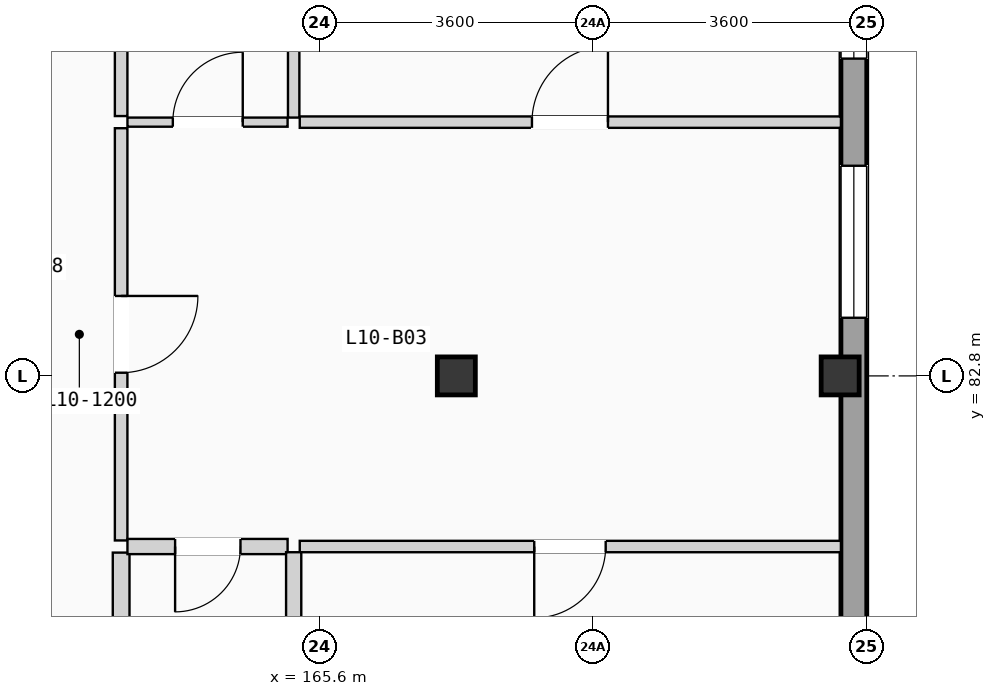
"""IFC4 building model, lengths in metres.
Left out: names, types, materials, properties, quantities, classifications, styles, units other than length and angle.
Written with IfcOpenShell. Run it as: python <this file> out.ifc"""

import sys

from ifc_helpers import new_model, si_unit, direction, frame, frame_2d, origin, origin_2d, place, context, subcontext, project, spatial, rectangle, extrude, element, fill, save


model = new_model("IFC4")
c1 = context("Model", 3, precision=1e-05, world=origin(), true_north=direction((0.0, 1.0)))
c2 = subcontext(c1, "Body", "Model", "MODEL_VIEW")
j1 = project(units=[si_unit("LENGTHUNIT", "METRE"), si_unit("PLANEANGLEUNIT", "RADIAN")], contexts=[c1])
p1 = place(None, origin())
s1 = spatial("IfcSite", under=j1, at=p1, CompositionType="ELEMENT")
p2 = place(p1, origin())
s2 = spatial("IfcBuilding", under=s1, at=p2, CompositionType="ELEMENT")
p3 = place(p2, frame((0.0, 0.0, 34.125)))
s3 = spatial("IfcBuildingStorey", under=s2, at=p3, CompositionType="ELEMENT", Elevation=34.125)
for number, where, z_axis, x_axis in (
    (1, (167.4, 82.8, 0.0), (0.0, 0.0, 1.0), (1.0, 0.0, 0.0)),
    (2, (172.45, 82.8, 0.0), (0.0, 0.0, 1.0), (1.0, 0.0, 0.0)),
):
    element("IfcColumn", number, at=place(p3, frame(where, z_axis=z_axis, x_axis=x_axis)), inside=s3, PredefinedType="COLUMN", context=c2, shape_type="SweptSolid", body=[
        extrude(rectangle(XDim=0.5, YDim=0.5, at=origin_2d()), origin(), (0.0, 0.0, 1.0), 3.15),
    ])
p4 = place(p3, frame((172.63, 68.74, 0.0), z_axis=(0.0, 0.0, 1.0), x_axis=(0.0, 1.0, 0.0)))
e3 = element("IfcWall", 3, at=p4, inside=s3, PredefinedType="SOLIDWALL", context=c2, shape_type="SweptSolid", body=[
    extrude(rectangle(XDim=49.72, YDim=0.34, at=frame_2d((24.86, 0.0))), origin(), (0.0, 0.0, 1.0), 2.89),
])
p5 = place(p4, frame((14.825, 0.0, 0.855)))
e4 = element("IfcOpeningElement", 4, at=p5, cuts=e3, PredefinedType="OPENING", context=c2, shape_type="SweptSolid", body=[
    extrude(rectangle(XDim=2.0, YDim=1.35, at=frame_2d((1.0, 0.675))), frame((0.0, 0.18, 0.0), z_axis=(0.0, -1.0, 0.0), x_axis=(1.0, 0.0, 0.0)), (0.0, 0.0, 1.0), 0.36),
])
p6 = place(p4, frame((8.498, 0.0, 0.705)))
e5 = element("IfcOpeningElement", 5, at=p6, cuts=e3, PredefinedType="OPENING", context=c2, shape_type="SweptSolid", body=[
    extrude(rectangle(XDim=2.0, YDim=1.5, at=frame_2d((1.0, 0.75))), frame((0.0, 0.18, 0.0), z_axis=(0.0, -1.0, 0.0), x_axis=(1.0, 0.0, 0.0)), (0.0, 0.0, 1.0), 0.36),
])
p7 = place(p4, frame((18.235, 0.0, 0.555)))
e6 = element("IfcOpeningElement", 6, at=p7, cuts=e3, PredefinedType="OPENING", context=c2, shape_type="SweptSolid", body=[
    extrude(rectangle(XDim=2.0, YDim=1.65, at=frame_2d((1.0, 0.825))), frame((0.0, 0.18, 0.0), z_axis=(0.0, -1.0, 0.0), x_axis=(1.0, 0.0, 0.0)), (0.0, 0.0, 1.0), 0.36),
])
p8 = place(p4, frame((31.585, 0.0, 0.85)))
e7 = element("IfcOpeningElement", 7, at=p8, cuts=e3, PredefinedType="OPENING", context=c2, shape_type="SweptSolid", body=[
    extrude(rectangle(XDim=0.95, YDim=1.2, at=frame_2d((0.475, 0.6))), frame((0.0, 0.18, 0.0), z_axis=(0.0, -1.0, 0.0), x_axis=(1.0, 0.0, 0.0)), (0.0, 0.0, 1.0), 0.36),
])
p9 = place(p4, frame((24.087, 0.0, 0.9)))
e8 = element("IfcOpeningElement", 8, at=p9, cuts=e3, PredefinedType="OPENING", context=c2, shape_type="SweptSolid", body=[
    extrude(rectangle(XDim=2.15, YDim=1.2, at=frame_2d((1.075, 0.6))), frame((0.0, 0.18, 0.0), z_axis=(0.0, -1.0, 0.0), x_axis=(1.0, 0.0, 0.0)), (0.0, 0.0, 1.0), 0.36),
])
p10 = place(p4, frame((38.12, 0.0, 0.855)))
e9 = element("IfcOpeningElement", 9, at=p10, cuts=e3, PredefinedType="OPENING", context=c2, shape_type="SweptSolid", body=[
    extrude(rectangle(XDim=2.15, YDim=1.35, at=frame_2d((1.075, 0.675))), frame((0.0, 0.18, 0.0), z_axis=(0.0, -1.0, 0.0), x_axis=(1.0, 0.0, 0.0)), (0.0, 0.0, 1.0), 0.36),
])
p11 = place(p3, frame((162.99, 80.635, 0.0), z_axis=(0.0, 0.0, 1.0), x_axis=(0.0, 1.0, 0.0)))
e10 = element("IfcWall", 10, at=p11, inside=s3, PredefinedType="PARTITIONING", context=c2, shape_type="SweptSolid", body=[
    extrude(rectangle(XDim=5.424, YDim=0.165, at=frame_2d((2.712, 0.0))), origin(), (0.0, 0.0, 1.0), 2.87),
])
p12 = place(p11, frame((2.207, 0.0, 0.0)))
e11 = element("IfcOpeningElement", 11, at=p12, cuts=e10, PredefinedType="OPENING", context=c2, shape_type="SweptSolid", body=[
    extrude(rectangle(XDim=1.01, YDim=2.11, at=frame_2d((0.505, 1.055))), frame((0.0, 0.093, 0.0), z_axis=(0.0, -1.0, 0.0), x_axis=(1.0, 0.0, 0.0)), (0.0, 0.0, 1.0), 0.185),
])
p13 = place(p3, frame((162.99, 75.975, 0.0), z_axis=(0.0, 0.0, 1.0), x_axis=(0.0, 1.0, 0.0)))
e12 = element("IfcWall", 12, at=p13, inside=s3, PredefinedType="PLUMBINGWALL", context=c2, shape_type="SweptSolid", body=[
    extrude(rectangle(XDim=4.5, YDim=0.22, at=frame_2d((2.25, 0.0))), origin(), (0.0, 0.0, 1.0), 2.87),
])
p14 = place(p3, frame((162.99, 86.219, 0.0), z_axis=(0.0, 0.0, 1.0), x_axis=(0.0, 1.0, 0.0)))
e13 = element("IfcWall", 13, at=p14, inside=s3, PredefinedType="PARTITIONING", context=c2, shape_type="SweptSolid", body=[
    extrude(rectangle(XDim=4.475, YDim=0.165, at=frame_2d((2.238, 0.0))), origin(), (0.0, 0.0, 1.0), 2.87),
])
p15 = place(p3, frame((163.073, 80.555, 0.0), z_axis=(0.0, 0.0, 1.0), x_axis=(1.0, 0.0, 0.0)))
e14 = element("IfcWall", 14, at=p15, inside=s3, PredefinedType="PLUMBINGWALL", context=c2, shape_type="SweptSolid", body=[
    extrude(rectangle(XDim=2.107, YDim=0.2, at=frame_2d((1.053, 0.0))), origin(), (0.0, 0.0, 1.0), 2.87),
])
p16 = place(p15, frame((0.627, 0.0, 0.0)))
e15 = element("IfcOpeningElement", 15, at=p16, cuts=e14, PredefinedType="OPENING", context=c2, shape_type="SweptSolid", body=[
    extrude(rectangle(XDim=0.86, YDim=2.0, at=frame_2d((0.43, 1.0))), frame((0.0, 0.11, 0.0), z_axis=(0.0, -1.0, 0.0), x_axis=(1.0, 0.0, 0.0)), (0.0, 0.0, 1.0), 0.22),
])
p17 = place(p3, frame((163.073, 86.139, 0.0), z_axis=(0.0, 0.0, 1.0), x_axis=(1.0, 0.0, 0.0)))
e16 = element("IfcWall", 16, at=p17, inside=s3, PredefinedType="PARTITIONING", context=c2, shape_type="SweptSolid", body=[
    extrude(rectangle(XDim=2.107, YDim=0.12, at=frame_2d((1.053, 0.0))), origin(), (0.0, 0.0, 1.0), 2.87),
])
p18 = place(p17, frame((0.597, 0.0, 0.0)))
e17 = element("IfcOpeningElement", 17, at=p18, cuts=e16, PredefinedType="OPENING", context=c2, shape_type="SweptSolid", body=[
    extrude(rectangle(XDim=0.92, YDim=2.02, at=frame_2d((0.46, 1.01))), frame((0.0, 0.07, 0.0), z_axis=(0.0, -1.0, 0.0), x_axis=(1.0, 0.0, 0.0)), (0.0, 0.0, 1.0), 0.14),
])
p19 = place(p3, frame((165.34, 80.555, 0.0), z_axis=(0.0, 0.0, 1.0), x_axis=(1.0, 0.0, 0.0)))
e18 = element("IfcWall", 18, at=p19, inside=s3, PredefinedType="PARTITIONING", context=c2, shape_type="SweptSolid", body=[
    extrude(rectangle(XDim=7.12, YDim=0.15, at=frame_2d((3.56, 0.0))), origin(), (0.0, 0.0, 1.0), 2.87),
])
p20 = place(p19, frame((3.085, 0.0, 0.0)))
e19 = element("IfcOpeningElement", 19, at=p20, cuts=e18, PredefinedType="OPENING", context=c2, shape_type="SweptSolid", body=[
    extrude(rectangle(XDim=0.94, YDim=2.06, at=frame_2d((0.47, 1.03))), frame((0.0, 0.085, 0.0), z_axis=(0.0, -1.0, 0.0), x_axis=(1.0, 0.0, 0.0)), (0.0, 0.0, 1.0), 0.17),
])
p21 = place(p3, frame((165.34, 86.139, 0.0), z_axis=(0.0, 0.0, 1.0), x_axis=(1.0, 0.0, 0.0)))
e20 = element("IfcWall", 20, at=p21, inside=s3, PredefinedType="PARTITIONING", context=c2, shape_type="SweptSolid", body=[
    extrude(rectangle(XDim=7.12, YDim=0.15, at=frame_2d((3.56, 0.0))), origin(), (0.0, 0.0, 1.0), 2.87),
])
p22 = place(p21, frame((3.055, 0.0, 0.0)))
e21 = element("IfcOpeningElement", 21, at=p22, cuts=e20, PredefinedType="OPENING", context=c2, shape_type="SweptSolid", body=[
    extrude(rectangle(XDim=1.0, YDim=2.06, at=frame_2d((0.5, 1.03))), frame((0.0, 0.085, 0.0), z_axis=(0.0, -1.0, 0.0), x_axis=(1.0, 0.0, 0.0)), (0.0, 0.0, 1.0), 0.17),
])
p23 = place(p3, frame((165.26, 75.975, 0.0), z_axis=(0.0, 0.0, 1.0), x_axis=(0.0, 1.0, 0.0)))
e22 = element("IfcWall", 22, at=p23, inside=s3, PredefinedType="PLUMBINGWALL", context=c2, shape_type="SweptSolid", body=[
    extrude(rectangle(XDim=4.505, YDim=0.2, at=frame_2d((2.252, 0.0))), origin(), (0.0, 0.0, 1.0), 2.87),
])
p24 = place(p3, frame((165.26, 86.199, 0.0), z_axis=(0.0, 0.0, 1.0), x_axis=(0.0, 1.0, 0.0)))
e23 = element("IfcWall", 23, at=p24, inside=s3, PredefinedType="PARTITIONING", context=c2, shape_type="SweptSolid", body=[
    extrude(rectangle(XDim=4.495, YDim=0.15, at=frame_2d((2.248, 0.0))), origin(), (0.0, 0.0, 1.0), 2.87),
])
p25 = place(p5, origin())
e24 = element("IfcWindow", 24, at=p25, inside=s3, PartitioningType="DOUBLE_PANEL_VERTICAL", PredefinedType="WINDOW", context=c2, shape_type="SweptSolid", body=[
    extrude(rectangle(XDim=2.0, YDim=1.35, at=frame_2d((1.0, 0.675))), frame((0.0, 0.03, 0.0), z_axis=(0.0, -1.0, 0.0), x_axis=(1.0, 0.0, 0.0)), (0.0, 0.0, 1.0), 0.06),
])
fill(e4, e24)
p26 = place(p7, origin())
e25 = element("IfcWindow", 25, at=p26, inside=s3, PartitioningType="DOUBLE_PANEL_VERTICAL", PredefinedType="WINDOW", context=c2, shape_type="SweptSolid", body=[
    extrude(rectangle(XDim=2.0, YDim=1.65, at=frame_2d((1.0, 0.825))), frame((0.0, 0.03, 0.0), z_axis=(0.0, -1.0, 0.0), x_axis=(1.0, 0.0, 0.0)), (0.0, 0.0, 1.0), 0.06),
])
fill(e6, e25)
p27 = place(p12, frame((1.01, 0.0, 0.0), z_axis=(0.0, 0.0, 1.0), x_axis=(-1.0, 0.0, 0.0)))
e26 = element("IfcDoor", 26, at=p27, inside=s3, OperationType="SINGLE_SWING_RIGHT", PredefinedType="DOOR", context=c2, shape_type="SweptSolid", body=[
    extrude(rectangle(XDim=1.01, YDim=2.11, at=frame_2d((0.505, 1.055))), frame((0.0, 0.025, 0.0), z_axis=(0.0, -1.0, 0.0), x_axis=(1.0, 0.0, 0.0)), (0.0, 0.0, 1.0), 0.05),
])
fill(e11, e26)
p28 = place(p16, frame((0.86, 0.0, 0.0), z_axis=(0.0, 0.0, 1.0), x_axis=(-1.0, 0.0, 0.0)))
e27 = element("IfcDoor", 27, at=p28, inside=s3, OperationType="SINGLE_SWING_LEFT", PredefinedType="DOOR", context=c2, shape_type="SweptSolid", body=[
    extrude(rectangle(XDim=0.86, YDim=2.0, at=frame_2d((0.43, 1.0))), frame((0.0, 0.025, 0.0), z_axis=(0.0, -1.0, 0.0), x_axis=(1.0, 0.0, 0.0)), (0.0, 0.0, 1.0), 0.05),
])
fill(e15, e27)
p29 = place(p18, origin())
e28 = element("IfcDoor", 28, at=p29, inside=s3, OperationType="SINGLE_SWING_RIGHT", PredefinedType="DOOR", context=c2, shape_type="SweptSolid", body=[
    extrude(rectangle(XDim=0.92, YDim=2.02, at=frame_2d((0.46, 1.01))), frame((0.0, 0.025, 0.0), z_axis=(0.0, -1.0, 0.0), x_axis=(1.0, 0.0, 0.0)), (0.0, 0.0, 1.0), 0.05),
])
fill(e17, e28)
p30 = place(p20, frame((0.94, 0.0, 0.0), z_axis=(0.0, 0.0, 1.0), x_axis=(-1.0, 0.0, 0.0)))
e29 = element("IfcDoor", 29, at=p30, inside=s3, OperationType="SINGLE_SWING_LEFT", PredefinedType="DOOR", context=c2, shape_type="SweptSolid", body=[
    extrude(rectangle(XDim=0.94, YDim=2.06, at=frame_2d((0.47, 1.03))), frame((0.0, 0.025, 0.0), z_axis=(0.0, -1.0, 0.0), x_axis=(1.0, 0.0, 0.0)), (0.0, 0.0, 1.0), 0.05),
])
fill(e19, e29)
p31 = place(p22, origin())
e30 = element("IfcDoor", 30, at=p31, inside=s3, OperationType="SINGLE_SWING_RIGHT", PredefinedType="DOOR", context=c2, shape_type="SweptSolid", body=[
    extrude(rectangle(XDim=1.0, YDim=2.06, at=frame_2d((0.5, 1.03))), frame((0.0, 0.025, 0.0), z_axis=(0.0, -1.0, 0.0), x_axis=(1.0, 0.0, 0.0)), (0.0, 0.0, 1.0), 0.05),
])
fill(e21, e30)
save(model, sys.argv[1])
